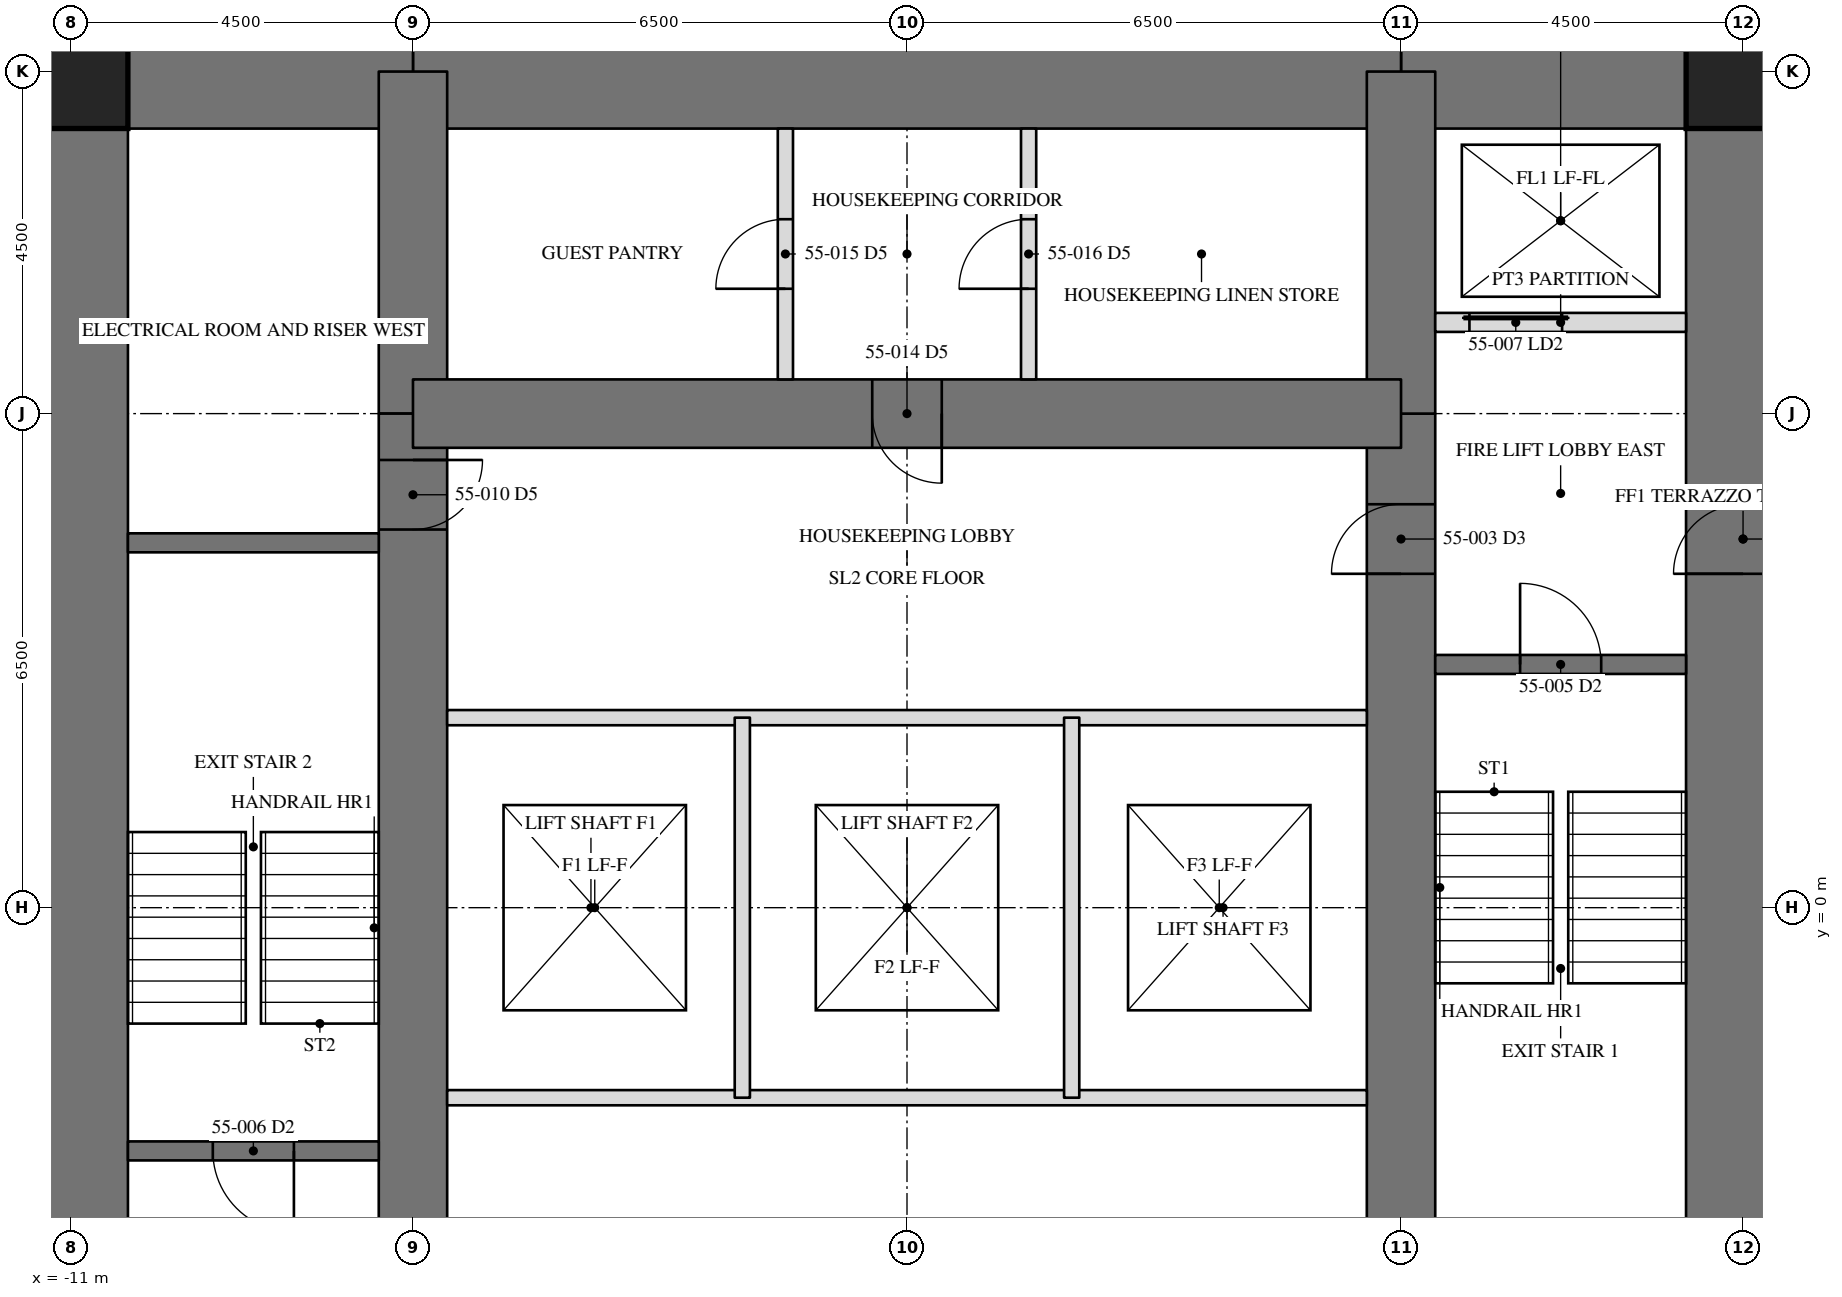
"""IFC4 building model, lengths in metres.
Left out: names, types, materials, properties, quantities, classifications, styles, units other than length and angle.
Written with IfcOpenShell. Run it as: python <this file> out.ifc"""

import sys

from ifc_helpers import new_model, si_unit, direction, frame, frame_2d, origin, origin_2d, place, context, subcontext, project, spatial, rectangle, hollow_rectangle, extrude, element, fill, save


model = new_model("IFC4")
c1 = context("Model", 3, precision=1e-05, world=origin(), true_north=direction((0.0, 1.0)))
c2 = subcontext(c1, "Body", "Model", "MODEL_VIEW")
j1 = project(units=[si_unit("LENGTHUNIT", "METRE"), si_unit("PLANEANGLEUNIT", "RADIAN")], contexts=[c1])
p1 = place(None, origin())
s1 = spatial("IfcSite", under=j1, at=p1, CompositionType="ELEMENT")
p2 = place(p1, origin())
s2 = spatial("IfcBuilding", under=s1, at=p2, CompositionType="ELEMENT")
p3 = place(p2, frame((0.0, 0.0, 229.2)))
s3 = spatial("IfcBuildingStorey", under=s2, at=p3, CompositionType="ELEMENT", Elevation=229.2)
p4 = place(p3, frame((11.0, -11.0, 0.0), z_axis=(0.0, 0.0, 1.0), x_axis=(0.0, 1.0, 0.0)))
e1 = element("IfcWall", 1, at=p4, inside=s3, PredefinedType="SHEAR", context=c2, shape_type="SweptSolid", body=[
    extrude(rectangle(XDim=22.0, YDim=1.5, at=frame_2d((11.0, 0.0))), origin(), (0.0, 0.0, 1.0), 3.5),
])
p5 = place(p4, frame((15.393, 0.0, 0.0)))
e2 = element("IfcOpeningElement", 2, at=p5, cuts=e1, PredefinedType="OPENING", context=c2, shape_type="SweptSolid", body=[
    extrude(rectangle(XDim=0.915, YDim=2.134, at=frame_2d((0.458, 1.067))), frame((0.0, 0.76, 0.0), z_axis=(0.0, -1.0, 0.0), x_axis=(1.0, 0.0, 0.0)), (0.0, 0.0, 1.0), 1.52),
])
p6 = place(p3, frame((-11.0, 11.0, 0.0), z_axis=(0.0, 0.0, 1.0), x_axis=(0.0, -1.0, 0.0)))
e3 = element("IfcWall", 3, at=p6, inside=s3, PredefinedType="SHEAR", context=c2, shape_type="SweptSolid", body=[
    extrude(rectangle(XDim=22.0, YDim=1.5, at=frame_2d((11.0, 0.0))), origin(), (0.0, 0.0, 1.0), 3.5),
])
p7 = place(p6, frame((15.393, 0.0, 0.0)))
e4 = element("IfcOpeningElement", 4, at=p7, cuts=e3, PredefinedType="OPENING", context=c2, shape_type="SweptSolid", body=[
    extrude(rectangle(XDim=0.915, YDim=2.134, at=frame_2d((0.458, 1.067))), frame((0.0, 0.76, 0.0), z_axis=(0.0, -1.0, 0.0), x_axis=(1.0, 0.0, 0.0)), (0.0, 0.0, 1.0), 1.52),
])
p8 = place(p3, frame((11.0, 11.0, 0.0), z_axis=(0.0, 0.0, 1.0), x_axis=(-1.0, 0.0, 0.0)))
e5 = element("IfcWall", 5, at=p8, inside=s3, PredefinedType="SHEAR", context=c2, shape_type="SweptSolid", body=[
    extrude(rectangle(XDim=4.5, YDim=1.5, at=frame_2d((2.25, 0.0))), origin(), (0.0, 0.0, 1.0), 3.5),
])
p9 = place(p3, frame((6.5, 11.0, 0.0), z_axis=(0.0, 0.0, 1.0), x_axis=(-1.0, 0.0, 0.0)))
e6 = element("IfcWall", 6, at=p9, inside=s3, PredefinedType="SHEAR", context=c2, shape_type="SweptSolid", body=[
    extrude(rectangle(XDim=13.0, YDim=1.5, at=frame_2d((6.5, 0.0))), origin(), (0.0, 0.0, 1.0), 3.5),
])
p10 = place(p3, frame((-6.5, 11.0, 0.0), z_axis=(0.0, 0.0, 1.0), x_axis=(-1.0, 0.0, 0.0)))
e7 = element("IfcWall", 7, at=p10, inside=s3, PredefinedType="SHEAR", context=c2, shape_type="SweptSolid", body=[
    extrude(rectangle(XDim=4.5, YDim=1.5, at=frame_2d((2.25, 0.0))), origin(), (0.0, 0.0, 1.0), 3.5),
])
p11 = place(p3, frame((6.5, -6.5, 0.0), z_axis=(0.0, 0.0, 1.0), x_axis=(0.0, 1.0, 0.0)))
e8 = element("IfcWall", 8, at=p11, inside=s3, PredefinedType="SHEAR", context=c2, shape_type="SweptSolid", body=[
    extrude(rectangle(XDim=13.0, YDim=0.9, at=frame_2d((6.5, 0.0))), origin(), (0.0, 0.0, 1.0), 3.5),
])
p12 = place(p11, frame((10.893, 0.0, 0.0)))
e9 = element("IfcOpeningElement", 9, at=p12, cuts=e8, PredefinedType="OPENING", context=c2, shape_type="SweptSolid", body=[
    extrude(rectangle(XDim=0.915, YDim=2.134, at=frame_2d((0.458, 1.067))), frame((0.0, 0.46, 0.0), z_axis=(0.0, -1.0, 0.0), x_axis=(1.0, 0.0, 0.0)), (0.0, 0.0, 1.0), 0.92),
])
p13 = place(p11, frame((0.61, 0.0, 0.0)))
e10 = element("IfcOpeningElement", 10, at=p13, cuts=e8, PredefinedType="OPENING", context=c2, shape_type="SweptSolid", body=[
    extrude(rectangle(XDim=0.915, YDim=2.134, at=frame_2d((0.458, 1.067))), frame((0.0, 0.46, 0.0), z_axis=(0.0, -1.0, 0.0), x_axis=(1.0, 0.0, 0.0)), (0.0, 0.0, 1.0), 0.92),
])
for number, where, z_axis, x_axis in (
    (11, (6.5, 6.5, 0.0), (0.0, 0.0, 1.0), (0.0, 1.0, 0.0)),
    (12, (-6.5, 11.0, 0.0), (0.0, 0.0, 1.0), (0.0, -1.0, 0.0)),
):
    element("IfcWall", number, at=place(p3, frame(where, z_axis=z_axis, x_axis=x_axis)), inside=s3, PredefinedType="SHEAR", context=c2, shape_type="SweptSolid", body=[
        extrude(rectangle(XDim=4.5, YDim=0.9, at=frame_2d((2.25, 0.0))), origin(), (0.0, 0.0, 1.0), 3.5),
    ])
p14 = place(p3, frame((-6.5, 6.5, 0.0), z_axis=(0.0, 0.0, 1.0), x_axis=(0.0, -1.0, 0.0)))
e13 = element("IfcWall", 13, at=p14, inside=s3, PredefinedType="SHEAR", context=c2, shape_type="SweptSolid", body=[
    extrude(rectangle(XDim=13.0, YDim=0.9, at=frame_2d((6.5, 0.0))), origin(), (0.0, 0.0, 1.0), 3.5),
])
p15 = place(p14, frame((10.893, 0.0, 0.0)))
e14 = element("IfcOpeningElement", 14, at=p15, cuts=e13, PredefinedType="OPENING", context=c2, shape_type="SweptSolid", body=[
    extrude(rectangle(XDim=0.915, YDim=2.134, at=frame_2d((0.458, 1.067))), frame((0.0, 0.46, 0.0), z_axis=(0.0, -1.0, 0.0), x_axis=(1.0, 0.0, 0.0)), (0.0, 0.0, 1.0), 0.92),
])
p16 = place(p14, frame((0.61, 0.0, 0.0)))
e15 = element("IfcOpeningElement", 15, at=p16, cuts=e13, PredefinedType="OPENING", context=c2, shape_type="SweptSolid", body=[
    extrude(rectangle(XDim=0.915, YDim=2.134, at=frame_2d((0.458, 1.067))), frame((0.0, 0.46, 0.0), z_axis=(0.0, -1.0, 0.0), x_axis=(1.0, 0.0, 0.0)), (0.0, 0.0, 1.0), 0.92),
])
p17 = place(p3, frame((6.5, 6.5, 0.0), z_axis=(0.0, 0.0, 1.0), x_axis=(-1.0, 0.0, 0.0)))
e16 = element("IfcWall", 16, at=p17, inside=s3, PredefinedType="SHEAR", context=c2, shape_type="SweptSolid", body=[
    extrude(rectangle(XDim=13.0, YDim=0.9, at=frame_2d((6.5, 0.0))), origin(), (0.0, 0.0, 1.0), 3.5),
])
p18 = place(p17, frame((6.042, 0.0, 0.0)))
e17 = element("IfcOpeningElement", 17, at=p18, cuts=e16, PredefinedType="OPENING", context=c2, shape_type="SweptSolid", body=[
    extrude(rectangle(XDim=0.915, YDim=2.134, at=frame_2d((0.458, 1.067))), frame((0.0, 0.46, 0.0), z_axis=(0.0, -1.0, 0.0), x_axis=(1.0, 0.0, 0.0)), (0.0, 0.0, 1.0), 0.92),
])
for number, where, z_axis, x_axis in (
    (18, (11.0, 11.0, 0.0), (0.0, 0.0, 1.0), (1.0, 0.0, 0.0)),
    (19, (-11.0, 11.0, 0.0), (0.0, 0.0, 1.0), (1.0, 0.0, 0.0)),
):
    element("IfcColumn", number, at=place(p3, frame(where, z_axis=z_axis, x_axis=x_axis)), inside=s3, PredefinedType="COLUMN", context=c2, shape_type="SweptSolid", body=[
        extrude(hollow_rectangle(XDim=1.499, YDim=1.499, WallThickness=0.102, at=origin_2d()), origin(), (0.0, 0.0, 1.0), 3.5),
    ])
p19 = place(p3, frame((-6.95, 4.8, 0.0), z_axis=(0.0, 0.0, 1.0), x_axis=(-1.0, 0.0, 0.0)))
e20 = element("IfcWall", 20, at=p19, inside=s3, PredefinedType="SOLIDWALL", context=c2, shape_type="SweptSolid", body=[
    extrude(rectangle(XDim=3.3, YDim=0.25, at=frame_2d((1.65, 0.0))), origin(), (0.0, 0.0, 1.0), 3.31),
])
p20 = place(p3, frame((6.95, 3.2, 0.0), z_axis=(0.0, 0.0, 1.0), x_axis=(1.0, 0.0, 0.0)))
e21 = element("IfcWall", 21, at=p20, inside=s3, PredefinedType="SOLIDWALL", context=c2, shape_type="SweptSolid", body=[
    extrude(rectangle(XDim=3.3, YDim=0.25, at=frame_2d((1.65, 0.0))), origin(), (0.0, 0.0, 1.0), 3.31),
])
p21 = place(p20, frame((1.116, 0.0, 0.0)))
e22 = element("IfcOpeningElement", 22, at=p21, cuts=e21, PredefinedType="OPENING", context=c2, shape_type="SweptSolid", body=[
    extrude(rectangle(XDim=1.067, YDim=2.134, at=frame_2d((0.533, 1.067))), frame((0.0, 0.135, 0.0), z_axis=(0.0, -1.0, 0.0), x_axis=(1.0, 0.0, 0.0)), (0.0, 0.0, 1.0), 0.27),
])
p22 = place(p3, frame((-6.95, -3.2, 0.0), z_axis=(0.0, 0.0, 1.0), x_axis=(-1.0, 0.0, 0.0)))
e23 = element("IfcWall", 23, at=p22, inside=s3, PredefinedType="SOLIDWALL", context=c2, shape_type="SweptSolid", body=[
    extrude(rectangle(XDim=3.3, YDim=0.25, at=frame_2d((1.65, 0.0))), origin(), (0.0, 0.0, 1.0), 3.31),
])
p23 = place(p22, frame((1.116, 0.0, 0.0)))
e24 = element("IfcOpeningElement", 24, at=p23, cuts=e23, PredefinedType="OPENING", context=c2, shape_type="SweptSolid", body=[
    extrude(rectangle(XDim=1.067, YDim=2.134, at=frame_2d((0.533, 1.067))), frame((0.0, 0.135, 0.0), z_axis=(0.0, -1.0, 0.0), x_axis=(1.0, 0.0, 0.0)), (0.0, 0.0, 1.0), 0.27),
])
p24 = place(p3, frame((6.95, 7.7, 0.0), z_axis=(0.0, 0.0, 1.0), x_axis=(1.0, 0.0, 0.0)))
e25 = element("IfcWall", 25, at=p24, inside=s3, PredefinedType="PARTITIONING", context=c2, shape_type="SweptSolid", body=[
    extrude(rectangle(XDim=3.3, YDim=0.25, at=frame_2d((1.65, 0.0))), origin(), (0.0, 0.0, 1.0), 3.31),
])
p25 = place(p24, frame((0.45, 0.0, 0.0)))
e26 = element("IfcOpeningElement", 26, at=p25, cuts=e25, PredefinedType="OPENING", context=c2, shape_type="SweptSolid", body=[
    extrude(rectangle(XDim=1.219, YDim=2.134, at=frame_2d((0.609, 1.067))), frame((0.0, 0.135, 0.0), z_axis=(0.0, -1.0, 0.0), x_axis=(1.0, 0.0, 0.0)), (0.0, 0.0, 1.0), 0.27),
])
for number, where, z_axis, x_axis in (
    (27, (-6.05, 2.5, 0.0), (0.0, 0.0, 1.0), (1.0, 0.0, 0.0)),
    (28, (6.05, -2.5, 0.0), (0.0, 0.0, 1.0), (-1.0, 0.0, 0.0)),
):
    element("IfcWall", number, at=place(p3, frame(where, z_axis=z_axis, x_axis=x_axis)), inside=s3, PredefinedType="PARTITIONING", context=c2, shape_type="SweptSolid", body=[
        extrude(rectangle(XDim=12.1, YDim=0.2, at=frame_2d((6.05, 0.0))), origin(), (0.0, 0.0, 1.0), 3.31),
    ])
for number, where, z_axis, x_axis in (
    (29, (-2.167, -2.5, 0.0), (0.0, 0.0, 1.0), (0.0, 1.0, 0.0)),
    (30, (2.167, -2.5, 0.0), (0.0, 0.0, 1.0), (0.0, 1.0, 0.0)),
):
    element("IfcWall", number, at=place(p3, frame(where, z_axis=z_axis, x_axis=x_axis)), inside=s3, PredefinedType="PARTITIONING", context=c2, shape_type="SweptSolid", body=[
        extrude(rectangle(XDim=5.0, YDim=0.2, at=frame_2d((2.5, 0.0))), origin(), (0.0, 0.0, 1.0), 3.31),
    ])
p26 = place(p3, frame((-1.6, 6.95, 0.0), z_axis=(0.0, 0.0, 1.0), x_axis=(0.0, 1.0, 0.0)))
e31 = element("IfcWall", 31, at=p26, inside=s3, PredefinedType="PARTITIONING", context=c2, shape_type="SweptSolid", body=[
    extrude(rectangle(XDim=3.3, YDim=0.2, at=frame_2d((1.65, 0.0))), origin(), (0.0, 0.0, 1.0), 3.31),
])
p27 = place(p26, frame((1.192, 0.0, 0.0)))
e32 = element("IfcOpeningElement", 32, at=p27, cuts=e31, PredefinedType="OPENING", context=c2, shape_type="SweptSolid", body=[
    extrude(rectangle(XDim=0.915, YDim=2.134, at=frame_2d((0.458, 1.067))), frame((0.0, 0.11, 0.0), z_axis=(0.0, -1.0, 0.0), x_axis=(1.0, 0.0, 0.0)), (0.0, 0.0, 1.0), 0.22),
])
p28 = place(p3, frame((1.6, 6.95, 0.0), z_axis=(0.0, 0.0, 1.0), x_axis=(0.0, 1.0, 0.0)))
e33 = element("IfcWall", 33, at=p28, inside=s3, PredefinedType="PARTITIONING", context=c2, shape_type="SweptSolid", body=[
    extrude(rectangle(XDim=3.3, YDim=0.2, at=frame_2d((1.65, 0.0))), origin(), (0.0, 0.0, 1.0), 3.31),
])
p29 = place(p28, frame((1.192, 0.0, 0.0)))
e34 = element("IfcOpeningElement", 34, at=p29, cuts=e33, PredefinedType="OPENING", context=c2, shape_type="SweptSolid", body=[
    extrude(rectangle(XDim=0.915, YDim=2.134, at=frame_2d((0.458, 1.067))), frame((0.0, 0.11, 0.0), z_axis=(0.0, -1.0, 0.0), x_axis=(1.0, 0.0, 0.0)), (0.0, 0.0, 1.0), 0.22),
])
p30 = place(p12, origin())
e35 = element("IfcDoor", 35, at=p30, inside=s3, OperationType="SINGLE_SWING_RIGHT", PredefinedType="DOOR", context=c2, shape_type="SweptSolid", body=[
    extrude(rectangle(XDim=0.915, YDim=2.134, at=frame_2d((0.458, 1.067))), frame((0.0, -0.375, 0.0), z_axis=(0.0, -1.0, 0.0), x_axis=(1.0, 0.0, 0.0)), (0.0, 0.0, 1.0), 0.05),
])
fill(e9, e35)
p31 = place(p21, origin())
e36 = element("IfcDoor", 36, at=p31, inside=s3, OperationType="SINGLE_SWING_LEFT", PredefinedType="DOOR", context=c2, shape_type="SweptSolid", body=[
    extrude(rectangle(XDim=1.067, YDim=2.134, at=frame_2d((0.533, 1.067))), frame((0.0, 0.025, 0.0), z_axis=(0.0, -1.0, 0.0), x_axis=(1.0, 0.0, 0.0)), (0.0, 0.0, 1.0), 0.05),
])
fill(e22, e36)
p32 = place(p23, origin())
e37 = element("IfcDoor", 37, at=p32, inside=s3, OperationType="SINGLE_SWING_LEFT", PredefinedType="DOOR", context=c2, shape_type="SweptSolid", body=[
    extrude(rectangle(XDim=1.067, YDim=2.134, at=frame_2d((0.533, 1.067))), frame((0.0, 0.025, 0.0), z_axis=(0.0, -1.0, 0.0), x_axis=(1.0, 0.0, 0.0)), (0.0, 0.0, 1.0), 0.05),
])
fill(e24, e37)
p33 = place(p25, origin())
e38 = element("IfcDoor", 38, at=p33, inside=s3, OperationType="SLIDING_TO_LEFT", PredefinedType="DOOR", context=c2, shape_type="SweptSolid", body=[
    extrude(rectangle(XDim=1.219, YDim=2.134, at=frame_2d((0.609, 1.067))), frame((0.0, 0.025, 0.0), z_axis=(0.0, -1.0, 0.0), x_axis=(1.0, 0.0, 0.0)), (0.0, 0.0, 1.0), 0.05),
])
fill(e26, e38)
p34 = place(p16, origin())
e39 = element("IfcDoor", 39, at=p34, inside=s3, OperationType="SINGLE_SWING_RIGHT", PredefinedType="DOOR", context=c2, shape_type="SweptSolid", body=[
    extrude(rectangle(XDim=0.915, YDim=2.134, at=frame_2d((0.458, 1.067))), frame((0.0, -0.375, 0.0), z_axis=(0.0, -1.0, 0.0), x_axis=(1.0, 0.0, 0.0)), (0.0, 0.0, 1.0), 0.05),
])
fill(e15, e39)
p35 = place(p18, origin())
e40 = element("IfcDoor", 40, at=p35, inside=s3, OperationType="SINGLE_SWING_RIGHT", PredefinedType="DOOR", context=c2, shape_type="SweptSolid", body=[
    extrude(rectangle(XDim=0.915, YDim=2.134, at=frame_2d((0.458, 1.067))), frame((0.0, -0.375, 0.0), z_axis=(0.0, -1.0, 0.0), x_axis=(1.0, 0.0, 0.0)), (0.0, 0.0, 1.0), 0.05),
])
fill(e17, e40)
p36 = place(p27, origin())
e41 = element("IfcDoor", 41, at=p36, inside=s3, OperationType="SINGLE_SWING_RIGHT", PredefinedType="DOOR", context=c2, shape_type="SweptSolid", body=[
    extrude(rectangle(XDim=0.915, YDim=2.134, at=frame_2d((0.458, 1.067))), frame((0.0, 0.025, 0.0), z_axis=(0.0, -1.0, 0.0), x_axis=(1.0, 0.0, 0.0)), (0.0, 0.0, 1.0), 0.05),
])
fill(e32, e41)
p37 = place(p29, origin())
e42 = element("IfcDoor", 42, at=p37, inside=s3, OperationType="SINGLE_SWING_RIGHT", PredefinedType="DOOR", context=c2, shape_type="SweptSolid", body=[
    extrude(rectangle(XDim=0.915, YDim=2.134, at=frame_2d((0.458, 1.067))), frame((0.0, 0.025, 0.0), z_axis=(0.0, -1.0, 0.0), x_axis=(1.0, 0.0, 0.0)), (0.0, 0.0, 1.0), 0.05),
])
fill(e34, e42)
save(model, sys.argv[1])
